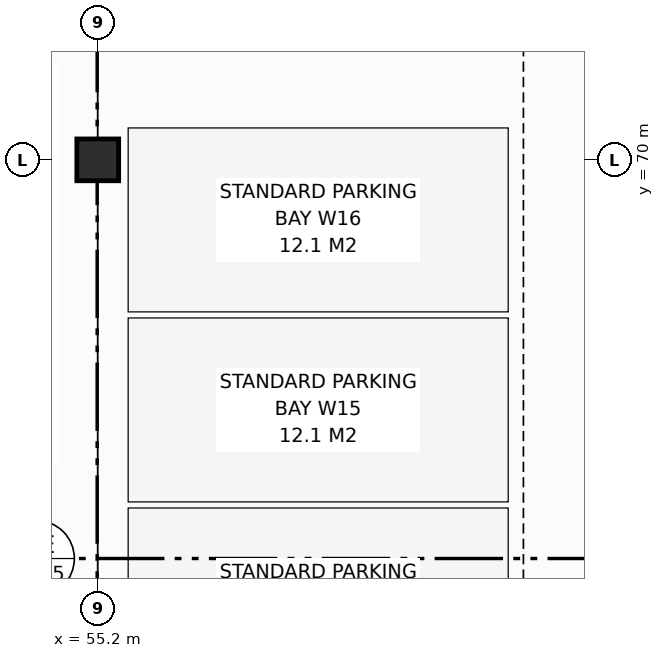
"""IFC4 building model, lengths in metres.
Left out: names, types, materials, properties, quantities, classifications, styles, units other than length and angle.
Written with IfcOpenShell. Run it as: python <this file> out.ifc"""

import sys

from ifc_helpers import new_model, si_unit, direction, frame, origin, origin_2d, place, context, subcontext, project, spatial, rectangle, extrude, element, save


model = new_model("IFC4")
c1 = context("Model", 3, precision=1e-05, world=origin(), true_north=direction((0.0, 1.0)))
c2 = subcontext(c1, "Body", "Model", "MODEL_VIEW")
j1 = project(units=[si_unit("LENGTHUNIT", "METRE"), si_unit("PLANEANGLEUNIT", "RADIAN")], contexts=[c1])
p1 = place(None, origin())
s1 = spatial("IfcSite", under=j1, at=p1, CompositionType="ELEMENT")
p2 = place(p1, origin())
s2 = spatial("IfcBuilding", under=s1, at=p2, CompositionType="ELEMENT")
p3 = place(p2, frame((0.0, 0.0, -3.8)))
s3 = spatial("IfcBuildingStorey", under=s2, at=p3, CompositionType="ELEMENT", Elevation=-3.8)
p4 = place(p3, frame((55.2, 70.0, 0.0), z_axis=(0.0, 0.0, 1.0), x_axis=(1.0, 0.0, 0.0)))
e1 = element("IfcColumn", 1, at=p4, inside=s3, PredefinedType="COLUMN", context=c2, shape_type="SweptSolid", body=[
    extrude(rectangle(XDim=0.55, YDim=0.55, at=origin_2d()), origin(), (0.0, 0.0, 1.0), 3.8),
])
save(model, sys.argv[1])
